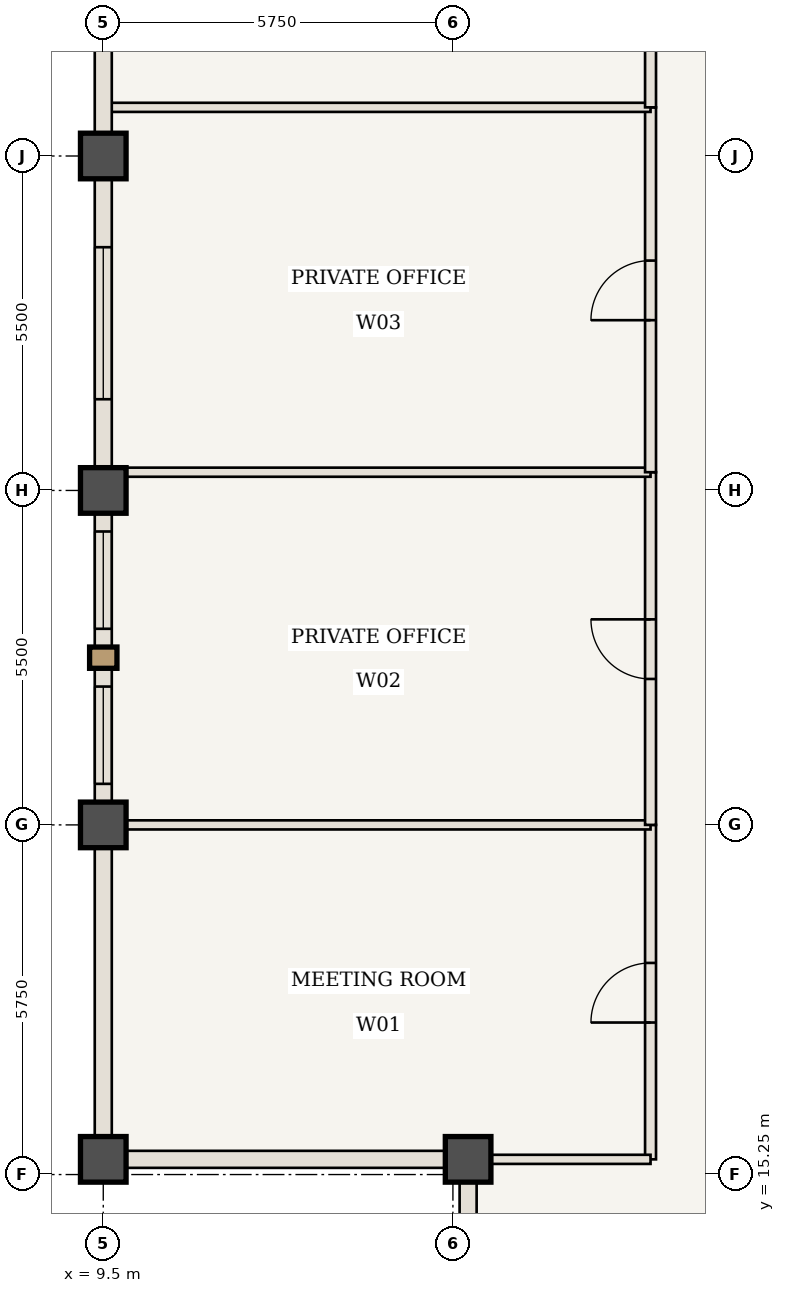
"""IFC4 building model, lengths in metres.
Left out: names, types, materials, properties, quantities, classifications, styles, units other than length and angle.
Written with IfcOpenShell. Run it as: python <this file> out.ifc"""

import sys

from ifc_helpers import new_model, si_unit, direction, frame, frame_2d, origin, origin_2d, place, context, subcontext, project, spatial, rectangle, extrude, element, fill, save


model = new_model("IFC4")
c1 = context("Model", 3, precision=1e-05, world=origin(), true_north=direction((0.0, 1.0)))
c2 = subcontext(c1, "Body", "Model", "MODEL_VIEW")
j1 = project(units=[si_unit("LENGTHUNIT", "METRE"), si_unit("PLANEANGLEUNIT", "RADIAN")], contexts=[c1])
p1 = place(None, origin())
s1 = spatial("IfcSite", under=j1, at=p1, CompositionType="ELEMENT")
p2 = place(p1, origin())
s2 = spatial("IfcBuilding", under=s1, at=p2, CompositionType="ELEMENT")
p3 = place(p2, frame((0.0, 0.0, 289.1)))
s3 = spatial("IfcBuildingStorey", under=s2, at=p3, CompositionType="ELEMENT", Elevation=289.1)
for number, where, z_axis, x_axis in (
    (1, (15.5, 15.5, 0.0), (0.0, 0.0, 1.0), (1.0, 0.0, 0.0)),
    (2, (9.5, 15.5, 0.0), (0.0, 0.0, 1.0), (1.0, 0.0, 0.0)),
    (3, (9.5, 21.0, 0.0), (0.0, 0.0, 1.0), (1.0, 0.0, 0.0)),
    (4, (9.5, 26.5, 0.0), (0.0, 0.0, 1.0), (1.0, 0.0, 0.0)),
    (5, (9.5, 32.0, 0.0), (0.0, 0.0, 1.0), (1.0, 0.0, 0.0)),
):
    element("IfcColumn", number, at=place(p3, frame(where, z_axis=z_axis, x_axis=x_axis)), inside=s3, PredefinedType="COLUMN", context=c2, shape_type="SweptSolid", body=[
        extrude(rectangle(XDim=0.75, YDim=0.75, at=origin_2d()), origin(), (0.0, 0.0, 1.0), 3.85),
    ])
p4 = place(p3, frame((18.5, 15.5, 0.0), z_axis=(0.0, 0.0, 1.0), x_axis=(0.0, 1.0, 0.0)))
e6 = element("IfcWall", 6, at=p4, inside=s3, PredefinedType="STANDARD", context=c2, shape_type="SweptSolid", body=[
    extrude(rectangle(XDim=5.5, YDim=0.18, at=frame_2d((2.75, 0.0))), origin(), (0.0, 0.0, 1.0), 3.685),
])
p5 = place(p4, frame((2.25, 0.0, 0.0)))
e7 = element("IfcOpeningElement", 7, at=p5, cuts=e6, PredefinedType="OPENING", context=c2, shape_type="SweptSolid", body=[
    extrude(rectangle(XDim=0.98, YDim=2.2, at=frame_2d((0.49, 1.1))), frame((0.0, 0.1, 0.0), z_axis=(0.0, -1.0, 0.0), x_axis=(1.0, 0.0, 0.0)), (0.0, 0.0, 1.0), 0.2),
])
p6 = place(p3, frame((9.56, 21.0, 0.0), z_axis=(0.0, 0.0, 1.0), x_axis=(1.0, 0.0, 0.0)))
e8 = element("IfcWall", 8, at=p6, inside=s3, PredefinedType="STANDARD", context=c2, shape_type="SweptSolid", body=[
    extrude(rectangle(XDim=8.94, YDim=0.15, at=frame_2d((4.47, 0.0))), origin(), (0.0, 0.0, 1.0), 3.685),
])
p7 = place(p3, frame((18.5, 21.0, 0.0), z_axis=(0.0, 0.0, 1.0), x_axis=(0.0, 1.0, 0.0)))
e9 = element("IfcWall", 9, at=p7, inside=s3, PredefinedType="STANDARD", context=c2, shape_type="SweptSolid", body=[
    extrude(rectangle(XDim=5.8, YDim=0.18, at=frame_2d((2.9, 0.0))), origin(), (0.0, 0.0, 1.0), 3.685),
])
p8 = place(p7, frame((2.4, 0.0, 0.0)))
e10 = element("IfcOpeningElement", 10, at=p8, cuts=e9, PredefinedType="OPENING", context=c2, shape_type="SweptSolid", body=[
    extrude(rectangle(XDim=0.98, YDim=2.2, at=frame_2d((0.49, 1.1))), frame((0.0, 0.1, 0.0), z_axis=(0.0, -1.0, 0.0), x_axis=(1.0, 0.0, 0.0)), (0.0, 0.0, 1.0), 0.2),
])
p9 = place(p3, frame((9.56, 26.8, 0.0), z_axis=(0.0, 0.0, 1.0), x_axis=(1.0, 0.0, 0.0)))
e11 = element("IfcWall", 11, at=p9, inside=s3, PredefinedType="STANDARD", context=c2, shape_type="SweptSolid", body=[
    extrude(rectangle(XDim=8.94, YDim=0.15, at=frame_2d((4.47, 0.0))), origin(), (0.0, 0.0, 1.0), 3.685),
])
p10 = place(p3, frame((18.5, 26.8, 0.0), z_axis=(0.0, 0.0, 1.0), x_axis=(0.0, 1.0, 0.0)))
e12 = element("IfcWall", 12, at=p10, inside=s3, PredefinedType="STANDARD", context=c2, shape_type="SweptSolid", body=[
    extrude(rectangle(XDim=6.0, YDim=0.18, at=frame_2d((3.0, 0.0))), origin(), (0.0, 0.0, 1.0), 3.685),
])
p11 = place(p10, frame((2.5, 0.0, 0.0)))
e13 = element("IfcOpeningElement", 13, at=p11, cuts=e12, PredefinedType="OPENING", context=c2, shape_type="SweptSolid", body=[
    extrude(rectangle(XDim=0.98, YDim=2.2, at=frame_2d((0.49, 1.1))), frame((0.0, 0.1, 0.0), z_axis=(0.0, -1.0, 0.0), x_axis=(1.0, 0.0, 0.0)), (0.0, 0.0, 1.0), 0.2),
])
p12 = place(p3, frame((9.56, 32.8, 0.0), z_axis=(0.0, 0.0, 1.0), x_axis=(1.0, 0.0, 0.0)))
e14 = element("IfcWall", 14, at=p12, inside=s3, PredefinedType="STANDARD", context=c2, shape_type="SweptSolid", body=[
    extrude(rectangle(XDim=8.94, YDim=0.15, at=frame_2d((4.47, 0.0))), origin(), (0.0, 0.0, 1.0), 3.685),
])
p13 = place(p3, frame((18.5, 32.8, 0.0), z_axis=(0.0, 0.0, 1.0), x_axis=(0.0, 1.0, 0.0)))
e15 = element("IfcWall", 15, at=p13, inside=s3, PredefinedType="STANDARD", context=c2, shape_type="SweptSolid", body=[
    extrude(rectangle(XDim=6.4, YDim=0.18, at=frame_2d((3.2, 0.0))), origin(), (0.0, 0.0, 1.0), 3.685),
])
p14 = place(p13, frame((2.7, 0.0, 0.0)))
e16 = element("IfcOpeningElement", 16, at=p14, cuts=e15, PredefinedType="OPENING", context=c2, shape_type="SweptSolid", body=[
    extrude(rectangle(XDim=0.98, YDim=2.2, at=frame_2d((0.49, 1.1))), frame((0.0, 0.1, 0.0), z_axis=(0.0, -1.0, 0.0), x_axis=(1.0, 0.0, 0.0)), (0.0, 0.0, 1.0), 0.2),
])
p15 = place(p3, frame((15.5, 15.5, 0.0), z_axis=(0.0, 0.0, 1.0), x_axis=(1.0, 0.0, 0.0)))
e17 = element("IfcWall", 17, at=p15, inside=s3, PredefinedType="STANDARD", context=c2, shape_type="SweptSolid", body=[
    extrude(rectangle(XDim=3.0, YDim=0.15, at=frame_2d((1.5, 0.0))), origin(), (0.0, 0.0, 1.0), 3.685),
])
p16 = place(p3, frame((9.5, 15.5, 0.0), z_axis=(0.0, 0.0, 1.0), x_axis=(0.0, 1.0, 0.0)))
e18 = element("IfcWall", 18, at=p16, inside=s3, PredefinedType="USERDEFINED", context=c2, shape_type="SweptSolid", body=[
    extrude(rectangle(XDim=5.5, YDim=0.28, at=frame_2d((2.75, 0.0))), origin(), (0.0, 0.0, 1.0), 2.985),
])
p17 = place(p3, frame((9.5, 21.0, 0.0), z_axis=(0.0, 0.0, 1.0), x_axis=(0.0, 1.0, 0.0)))
e19 = element("IfcWall", 19, at=p17, inside=s3, PredefinedType="USERDEFINED", context=c2, shape_type="SweptSolid", body=[
    extrude(rectangle(XDim=5.5, YDim=0.28, at=frame_2d((2.75, 0.0))), origin(), (0.0, 0.0, 1.0), 2.985),
])
p18 = place(p17, frame((0.675, 0.0, 0.85)))
e20 = element("IfcOpeningElement", 20, at=p18, cuts=e19, PredefinedType="OPENING", context=c2, shape_type="SweptSolid", body=[
    extrude(rectangle(XDim=1.6, YDim=1.935, at=frame_2d((0.8, 0.968))), frame((0.0, 0.15, 0.0), z_axis=(0.0, -1.0, 0.0), x_axis=(1.0, 0.0, 0.0)), (0.0, 0.0, 1.0), 0.3),
])
p19 = place(p17, frame((3.225, 0.0, 0.85)))
e21 = element("IfcOpeningElement", 21, at=p19, cuts=e19, PredefinedType="OPENING", context=c2, shape_type="SweptSolid", body=[
    extrude(rectangle(XDim=1.6, YDim=1.935, at=frame_2d((0.8, 0.968))), frame((0.0, 0.15, 0.0), z_axis=(0.0, -1.0, 0.0), x_axis=(1.0, 0.0, 0.0)), (0.0, 0.0, 1.0), 0.3),
])
p20 = place(p3, frame((9.5, 26.5, 0.0), z_axis=(0.0, 0.0, 1.0), x_axis=(0.0, 1.0, 0.0)))
e22 = element("IfcWall", 22, at=p20, inside=s3, PredefinedType="USERDEFINED", context=c2, shape_type="SweptSolid", body=[
    extrude(rectangle(XDim=5.5, YDim=0.28, at=frame_2d((2.75, 0.0))), origin(), (0.0, 0.0, 1.0), 2.985),
])
p21 = place(p20, frame((1.5, 0.0, 0.85)))
e23 = element("IfcOpeningElement", 23, at=p21, cuts=e22, PredefinedType="OPENING", context=c2, shape_type="SweptSolid", body=[
    extrude(rectangle(XDim=2.5, YDim=1.935, at=frame_2d((1.25, 0.968))), frame((0.0, 0.15, 0.0), z_axis=(0.0, -1.0, 0.0), x_axis=(1.0, 0.0, 0.0)), (0.0, 0.0, 1.0), 0.3),
])
p22 = place(p3, frame((9.5, 32.0, 0.0), z_axis=(0.0, 0.0, 1.0), x_axis=(0.0, 1.0, 0.0)))
e24 = element("IfcWall", 24, at=p22, inside=s3, PredefinedType="USERDEFINED", context=c2, shape_type="SweptSolid", body=[
    extrude(rectangle(XDim=5.5, YDim=0.28, at=frame_2d((2.75, 0.0))), origin(), (0.0, 0.0, 1.0), 2.985),
])
p23 = place(p22, frame((1.738, 0.0, 0.85)))
e25 = element("IfcOpeningElement", 25, at=p23, cuts=e24, PredefinedType="OPENING", context=c2, shape_type="SweptSolid", body=[
    extrude(rectangle(XDim=2.5, YDim=1.935, at=frame_2d((1.25, 0.968))), frame((0.0, 0.15, 0.0), z_axis=(0.0, -1.0, 0.0), x_axis=(1.0, 0.0, 0.0)), (0.0, 0.0, 1.0), 0.3),
])
for number, where, z_axis, x_axis in (
    (26, (15.5, 9.5, 0.0), (0.0, 0.0, 1.0), (0.0, 1.0, 0.0)),
    (27, (15.5, 15.5, 0.0), (0.0, 0.0, 1.0), (-1.0, 0.0, 0.0)),
):
    element("IfcWall", number, at=place(p3, frame(where, z_axis=z_axis, x_axis=x_axis)), inside=s3, PredefinedType="USERDEFINED", context=c2, shape_type="SweptSolid", body=[
        extrude(rectangle(XDim=6.0, YDim=0.28, at=frame_2d((3.0, 0.0))), origin(), (0.0, 0.0, 1.0), 2.985),
    ])
p24 = place(p5, origin())
e28 = element("IfcDoor", 28, at=p24, inside=s3, OperationType="SINGLE_SWING_LEFT", PredefinedType="DOOR", context=c2, shape_type="SweptSolid", body=[
    extrude(rectangle(XDim=0.98, YDim=2.2, at=frame_2d((0.49, 1.1))), frame((0.0, 0.025, 0.0), z_axis=(0.0, -1.0, 0.0), x_axis=(1.0, 0.0, 0.0)), (0.0, 0.0, 1.0), 0.05),
])
fill(e7, e28)
p25 = place(p8, origin())
e29 = element("IfcDoor", 29, at=p25, inside=s3, OperationType="SINGLE_SWING_RIGHT", PredefinedType="DOOR", context=c2, shape_type="SweptSolid", body=[
    extrude(rectangle(XDim=0.98, YDim=2.2, at=frame_2d((0.49, 1.1))), frame((0.0, 0.025, 0.0), z_axis=(0.0, -1.0, 0.0), x_axis=(1.0, 0.0, 0.0)), (0.0, 0.0, 1.0), 0.05),
])
fill(e10, e29)
p26 = place(p11, origin())
e30 = element("IfcDoor", 30, at=p26, inside=s3, OperationType="SINGLE_SWING_LEFT", PredefinedType="DOOR", context=c2, shape_type="SweptSolid", body=[
    extrude(rectangle(XDim=0.98, YDim=2.2, at=frame_2d((0.49, 1.1))), frame((0.0, 0.025, 0.0), z_axis=(0.0, -1.0, 0.0), x_axis=(1.0, 0.0, 0.0)), (0.0, 0.0, 1.0), 0.05),
])
fill(e13, e30)
p27 = place(p18, origin())
e31 = element("IfcWindow", 31, at=p27, inside=s3, PartitioningType="SINGLE_PANEL", PredefinedType="WINDOW", context=c2, shape_type="SweptSolid", body=[
    extrude(rectangle(XDim=1.6, YDim=1.935, at=frame_2d((0.8, 0.968))), frame((0.0, 0.03, 0.0), z_axis=(0.0, -1.0, 0.0), x_axis=(1.0, 0.0, 0.0)), (0.0, 0.0, 1.0), 0.06),
])
fill(e20, e31)
p28 = place(p19, origin())
e32 = element("IfcWindow", 32, at=p28, inside=s3, PartitioningType="SINGLE_PANEL", PredefinedType="WINDOW", context=c2, shape_type="SweptSolid", body=[
    extrude(rectangle(XDim=1.6, YDim=1.935, at=frame_2d((0.8, 0.968))), frame((0.0, 0.03, 0.0), z_axis=(0.0, -1.0, 0.0), x_axis=(1.0, 0.0, 0.0)), (0.0, 0.0, 1.0), 0.06),
])
fill(e21, e32)
p29 = place(p21, origin())
e33 = element("IfcWindow", 33, at=p29, inside=s3, PartitioningType="SINGLE_PANEL", PredefinedType="WINDOW", context=c2, shape_type="SweptSolid", body=[
    extrude(rectangle(XDim=2.5, YDim=1.935, at=frame_2d((1.25, 0.968))), frame((0.0, 0.03, 0.0), z_axis=(0.0, -1.0, 0.0), x_axis=(1.0, 0.0, 0.0)), (0.0, 0.0, 1.0), 0.06),
])
fill(e23, e33)
save(model, sys.argv[1])
